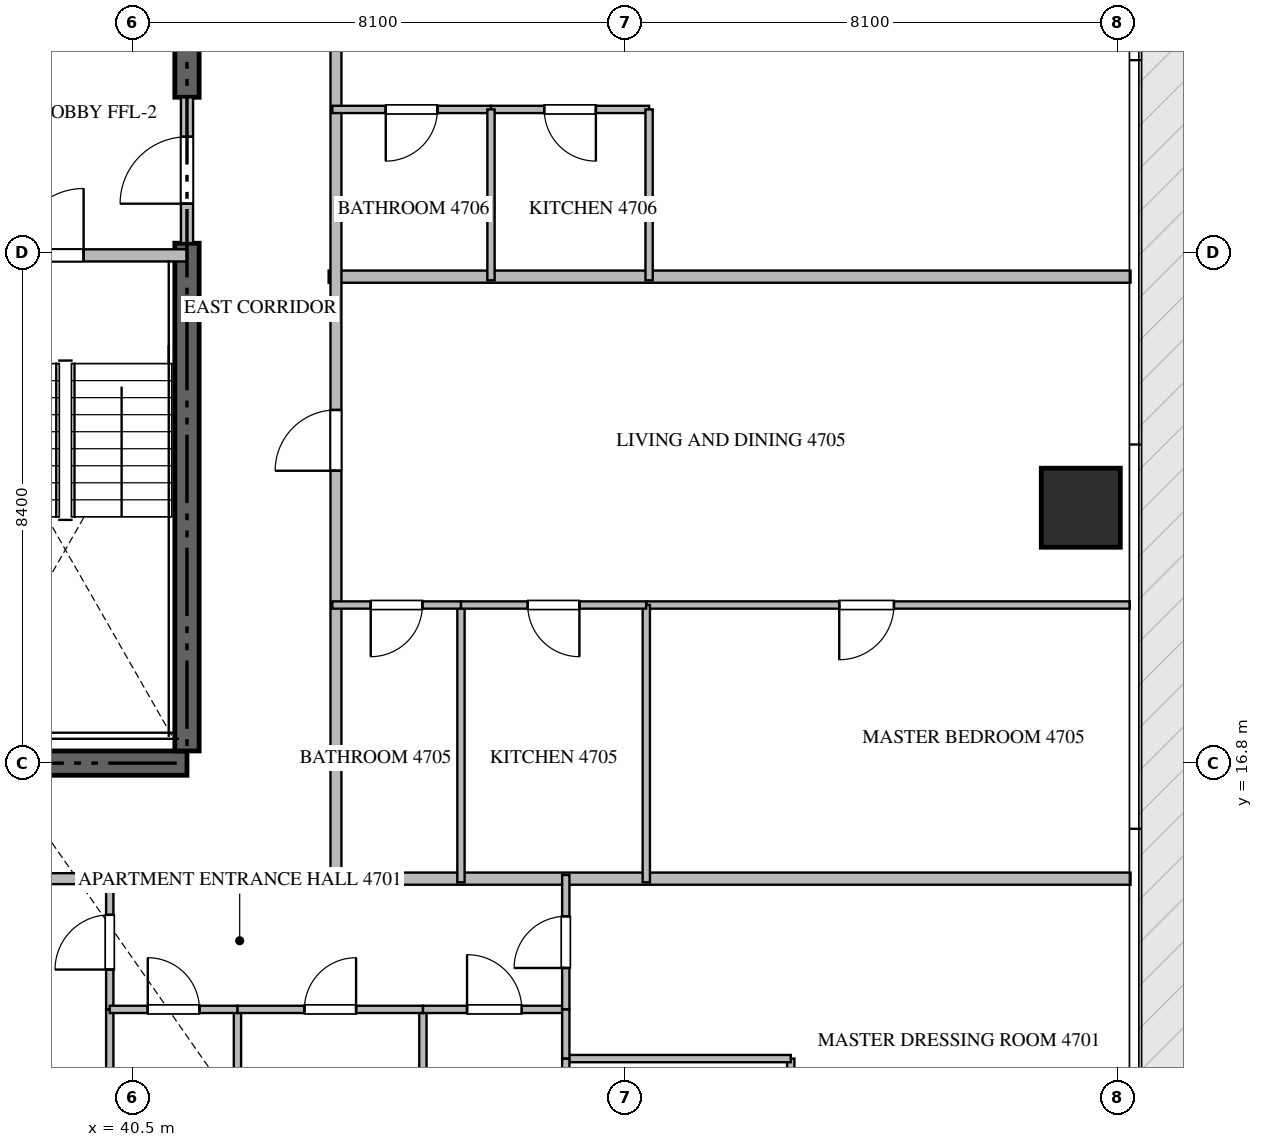
"""IFC4 building model, lengths in metres.
Left out: names, types, materials, properties, quantities, classifications, styles, units other than length and angle.
Written with IfcOpenShell. Run it as: python <this file> out.ifc"""

import sys

from ifc_helpers import new_model, si_unit, direction, frame, frame_2d, origin, origin_2d, place, context, subcontext, project, spatial, rectangle, extrude, source, transform, mapped, element, fill, save


model = new_model("IFC4")
c1 = context("Model", 3, precision=1e-05, world=origin(), true_north=direction((0.0, 1.0)))
c2 = subcontext(c1, "Body", "Model", "MODEL_VIEW")
j1 = project(units=[si_unit("LENGTHUNIT", "METRE"), si_unit("PLANEANGLEUNIT", "RADIAN")], contexts=[c1])
p1 = place(None, origin())
s1 = spatial("IfcSite", under=j1, at=p1, CompositionType="ELEMENT")
p2 = place(p1, origin())
s2 = spatial("IfcBuilding", under=s1, at=p2, CompositionType="ELEMENT")
p3 = place(p2, frame((0.0, 0.0, 187.65)))
s3 = spatial("IfcBuildingStorey", under=s2, at=p3, CompositionType="ELEMENT", Elevation=187.65)
p4 = place(p3, frame((23.4, 16.8, -0.26), z_axis=(0.0, 0.0, 1.0), x_axis=(1.0, 0.0, 0.0)))
e1 = element("IfcWall", 1, at=p4, inside=s3, PredefinedType="SHEAR", context=c2, shape_type="SweptSolid", body=[
    extrude(rectangle(XDim=18.0, YDim=0.4, at=frame_2d((9.0, 0.0))), origin(), (0.0, 0.0, 1.0), 3.748),
])
p5 = place(p3, frame((41.4, 17.0, -0.26), z_axis=(0.0, 0.0, 1.0), x_axis=(0.0, 1.0, 0.0)))
e2 = element("IfcWall", 2, at=p5, inside=s3, PredefinedType="SHEAR", context=c2, shape_type="SweptSolid", body=[
    extrude(rectangle(XDim=8.35, YDim=0.4, at=frame_2d((4.175, 0.0))), origin(), (0.0, 0.0, 1.0), 3.748),
])
p6 = place(p3, frame((41.4, 27.75, -0.26), z_axis=(0.0, 0.0, 1.0), x_axis=(0.0, 1.0, 0.0)))
e3 = element("IfcWall", 3, at=p6, inside=s3, PredefinedType="SHEAR", context=c2, shape_type="SweptSolid", body=[
    extrude(rectangle(XDim=5.65, YDim=0.4, at=frame_2d((2.825, 0.0))), origin(), (0.0, 0.0, 1.0), 3.748),
])
m1 = source(origin(), c2, "Body", "SweptSolid", [
    extrude(rectangle(XDim=1.3, YDim=1.3, at=origin_2d()), origin(), (0.0, 0.0, 1.0), 3.75),
])
p7 = place(p3, frame((56.1, 21.0, -0.26), z_axis=(0.0, 0.0, 1.0), x_axis=(1.0, 0.0, 0.0)))
e4 = element("IfcColumn", 4, at=p7, inside=s3, PredefinedType="COLUMN", context=c2, shape_type="MappedRepresentation", body=[
    mapped(m1, transform((0.0, 0.0, 0.0), scale=1.0)),
])
p8 = place(p3, frame((36.95, 25.15, 0.0), z_axis=(0.0, 0.0, 1.0), x_axis=(1.0, 0.0, 0.0)))
e5 = element("IfcWall", 5, at=p8, inside=s3, PredefinedType="STANDARD", context=c2, shape_type="SweptSolid", body=[
    extrude(rectangle(XDim=4.45, YDim=0.2, at=frame_2d((2.225, 0.0))), origin(), (0.0, 0.0, 1.0), 3.49),
])
p9 = place(p8, frame((1.65, 0.0, 0.0)))
e6 = element("IfcOpeningElement", 6, at=p9, cuts=e5, PredefinedType="OPENING", context=c2, shape_type="SweptSolid", body=[
    extrude(rectangle(XDim=1.1, YDim=2.15, at=frame_2d((0.55, 1.075))), frame((0.0, 0.11, 0.0), z_axis=(0.0, -1.0, 0.0), x_axis=(1.0, 0.0, 0.0)), (0.0, 0.0, 1.0), 0.22),
])
p10 = place(p3, frame((41.4, 25.352, 0.0), z_axis=(0.0, 0.0, 1.0), x_axis=(0.0, 1.0, 0.0)))
e7 = element("IfcWall", 7, at=p10, inside=s3, PredefinedType="STANDARD", context=c2, shape_type="SweptSolid", body=[
    extrude(rectangle(XDim=2.396, YDim=0.2, at=frame_2d((1.198, 0.0))), origin(), (0.0, 0.0, 1.0), 3.49),
])
p11 = place(p10, frame((0.648, 0.0, 0.0)))
e8 = element("IfcOpeningElement", 8, at=p11, cuts=e7, PredefinedType="OPENING", context=c2, shape_type="SweptSolid", body=[
    extrude(rectangle(XDim=1.1, YDim=2.15, at=frame_2d((0.55, 1.075))), frame((0.0, 0.11, 0.0), z_axis=(0.0, -1.0, 0.0), x_axis=(1.0, 0.0, 0.0)), (0.0, 0.0, 1.0), 0.22),
])
p12 = place(p3, frame((43.73, 24.8, 0.0), z_axis=(0.0, 0.0, 1.0), x_axis=(1.0, 0.0, 0.0)))
e9 = element("IfcWall", 9, at=p12, inside=s3, PredefinedType="PARTITIONING", context=c2, shape_type="SweptSolid", body=[
    extrude(rectangle(XDim=13.188, YDim=0.2, at=frame_2d((6.594, 0.0))), origin(), (0.0, 0.0, 1.0), 3.49),
])
p13 = place(p3, frame((43.85, 14.9, 0.0), z_axis=(0.0, 0.0, 1.0), x_axis=(1.0, 0.0, 0.0)))
e10 = element("IfcWall", 10, at=p13, inside=s3, PredefinedType="PARTITIONING", context=c2, shape_type="SweptSolid", body=[
    extrude(rectangle(XDim=13.068, YDim=0.2, at=frame_2d((6.534, 0.0))), origin(), (0.0, 0.0, 1.0), 3.49),
])
p14 = place(p3, frame((20.952, 14.9, 0.0), z_axis=(0.0, 0.0, 1.0), x_axis=(1.0, 0.0, 0.0)))
e11 = element("IfcWall", 11, at=p14, inside=s3, PredefinedType="PARTITIONING", context=c2, shape_type="SweptSolid", body=[
    extrude(rectangle(XDim=22.896, YDim=0.18, at=frame_2d((11.448, 0.0))), origin(), (0.0, 0.0, 1.0), 3.49),
])
p15 = place(p14, frame((15.809, 0.0, 0.0)))
e12 = element("IfcOpeningElement", 12, at=p15, cuts=e11, PredefinedType="OPENING", context=c2, shape_type="SweptSolid", body=[
    extrude(rectangle(XDim=1.0, YDim=2.15, at=frame_2d((0.5, 1.075))), frame((0.0, 0.1, 0.0), z_axis=(0.0, -1.0, 0.0), x_axis=(1.0, 0.0, 0.0)), (0.0, 0.0, 1.0), 0.2),
])
p16 = place(p3, frame((43.85, 14.9, 0.0), z_axis=(0.0, 0.0, 1.0), x_axis=(0.0, 1.0, 0.0)))
e13 = element("IfcWall", 13, at=p16, inside=s3, PredefinedType="PARTITIONING", context=c2, shape_type="SweptSolid", body=[
    extrude(rectangle(XDim=18.7, YDim=0.18, at=frame_2d((9.35, 0.0))), origin(), (0.0, 0.0, 1.0), 3.49),
])
p17 = place(p16, frame((6.708, 0.0, 0.0)))
e14 = element("IfcOpeningElement", 14, at=p17, cuts=e13, PredefinedType="OPENING", context=c2, shape_type="SweptSolid", body=[
    extrude(rectangle(XDim=1.0, YDim=2.15, at=frame_2d((0.5, 1.075))), frame((0.0, 0.1, 0.0), z_axis=(0.0, -1.0, 0.0), x_axis=(1.0, 0.0, 0.0)), (0.0, 0.0, 1.0), 0.2),
])
p18 = place(p16, frame((15.134, 0.0, 0.0)))
e15 = element("IfcOpeningElement", 15, at=p18, cuts=e13, PredefinedType="OPENING", context=c2, shape_type="SweptSolid", body=[
    extrude(rectangle(XDim=1.0, YDim=2.15, at=frame_2d((0.5, 1.075))), frame((0.0, 0.1, 0.0), z_axis=(0.0, -1.0, 0.0), x_axis=(1.0, 0.0, 0.0)), (0.0, 0.0, 1.0), 0.2),
])
p19 = place(p3, frame((40.13, 12.75, 0.0), z_axis=(0.0, 0.0, 1.0), x_axis=(0.0, 1.0, 0.0)))
e16 = element("IfcWall", 16, at=p19, inside=s3, PredefinedType="PARTITIONING", context=c2, shape_type="SweptSolid", body=[
    extrude(rectangle(XDim=2.21, YDim=0.12, at=frame_2d((1.105, 0.0))), origin(), (0.0, 0.0, 1.0), 3.49),
])
p20 = place(p19, frame((0.655, 0.0, 0.0)))
e17 = element("IfcOpeningElement", 17, at=p20, cuts=e16, PredefinedType="OPENING", context=c2, shape_type="SweptSolid", body=[
    extrude(rectangle(XDim=0.9, YDim=2.1, at=frame_2d((0.45, 1.05))), frame((0.0, 0.07, 0.0), z_axis=(0.0, -1.0, 0.0), x_axis=(1.0, 0.0, 0.0)), (0.0, 0.0, 1.0), 0.14),
])
p21 = place(p3, frame((40.13, 8.065, 0.0), z_axis=(0.0, 0.0, 1.0), x_axis=(0.0, 1.0, 0.0)))
e18 = element("IfcWall", 18, at=p21, inside=s3, PredefinedType="PARTITIONING", context=c2, shape_type="SweptSolid", body=[
    extrude(rectangle(XDim=4.683, YDim=0.12, at=frame_2d((2.342, 0.0))), origin(), (0.0, 0.0, 1.0), 3.49),
])
p22 = place(p3, frame((45.28, 1.495, 0.0), z_axis=(0.0, 0.0, 1.0), x_axis=(0.0, 1.0, 0.0)))
e19 = element("IfcWall", 19, at=p22, inside=s3, PredefinedType="PARTITIONING", context=c2, shape_type="SweptSolid", body=[
    extrude(rectangle(XDim=11.255, YDim=0.12, at=frame_2d((5.627, 0.0))), origin(), (0.0, 0.0, 1.0), 3.49),
])
p23 = place(p3, frame((42.23, 8.063, 0.0), z_axis=(0.0, 0.0, 1.0), x_axis=(0.0, 1.0, 0.0)))
e20 = element("IfcWall", 20, at=p23, inside=s3, PredefinedType="PARTITIONING", context=c2, shape_type="SweptSolid", body=[
    extrude(rectangle(XDim=4.687, YDim=0.12, at=frame_2d((2.344, 0.0))), origin(), (0.0, 0.0, 1.0), 3.49),
])
p24 = place(p3, frame((40.13, 12.75, 0.0), z_axis=(0.0, 0.0, 1.0), x_axis=(1.0, 0.0, 0.0)))
e21 = element("IfcWall", 21, at=p24, inside=s3, PredefinedType="PARTITIONING", context=c2, shape_type="SweptSolid", body=[
    extrude(rectangle(XDim=2.1, YDim=0.12, at=frame_2d((1.05, 0.0))), origin(), (0.0, 0.0, 1.0), 3.49),
])
p25 = place(p24, frame((0.625, 0.0, 0.0)))
e22 = element("IfcOpeningElement", 22, at=p25, cuts=e21, PredefinedType="OPENING", context=c2, shape_type="SweptSolid", body=[
    extrude(rectangle(XDim=0.85, YDim=2.1, at=frame_2d((0.425, 1.05))), frame((0.0, 0.07, 0.0), z_axis=(0.0, -1.0, 0.0), x_axis=(1.0, 0.0, 0.0)), (0.0, 0.0, 1.0), 0.14),
])
p26 = place(p3, frame((42.232, 12.75, 0.0), z_axis=(0.0, 0.0, 1.0), x_axis=(1.0, 0.0, 0.0)))
e23 = element("IfcWall", 23, at=p26, inside=s3, PredefinedType="PARTITIONING", context=c2, shape_type="SweptSolid", body=[
    extrude(rectangle(XDim=3.048, YDim=0.12, at=frame_2d((1.524, 0.0))), origin(), (0.0, 0.0, 1.0), 3.49),
])
p27 = place(p26, frame((1.099, 0.0, 0.0)))
e24 = element("IfcOpeningElement", 24, at=p27, cuts=e23, PredefinedType="OPENING", context=c2, shape_type="SweptSolid", body=[
    extrude(rectangle(XDim=0.85, YDim=2.1, at=frame_2d((0.425, 1.05))), frame((0.0, 0.07, 0.0), z_axis=(0.0, -1.0, 0.0), x_axis=(1.0, 0.0, 0.0)), (0.0, 0.0, 1.0), 0.14),
])
p28 = place(p3, frame((45.282, 12.75, 0.0), z_axis=(0.0, 0.0, 1.0), x_axis=(1.0, 0.0, 0.0)))
e25 = element("IfcWall", 25, at=p28, inside=s3, PredefinedType="PARTITIONING", context=c2, shape_type="SweptSolid", body=[
    extrude(rectangle(XDim=2.348, YDim=0.12, at=frame_2d((1.174, 0.0))), origin(), (0.0, 0.0, 1.0), 3.49),
])
p29 = place(p28, frame((0.724, 0.0, 0.0)))
e26 = element("IfcOpeningElement", 26, at=p29, cuts=e25, PredefinedType="OPENING", context=c2, shape_type="SweptSolid", body=[
    extrude(rectangle(XDim=0.9, YDim=2.1, at=frame_2d((0.45, 1.05))), frame((0.0, 0.07, 0.0), z_axis=(0.0, -1.0, 0.0), x_axis=(1.0, 0.0, 0.0)), (0.0, 0.0, 1.0), 0.14),
])
p30 = place(p3, frame((51.33, 5.495, 0.0), z_axis=(0.0, 0.0, 1.0), x_axis=(0.0, 1.0, 0.0)))
e27 = element("IfcWall", 27, at=p30, inside=s3, PredefinedType="PARTITIONING", context=c2, shape_type="SweptSolid", body=[
    extrude(rectangle(XDim=6.446, YDim=0.12, at=frame_2d((3.223, 0.0))), origin(), (0.0, 0.0, 1.0), 3.49),
])
p31 = place(p3, frame((47.63, 11.941, 0.0), z_axis=(0.0, 0.0, 1.0), x_axis=(1.0, 0.0, 0.0)))
e28 = element("IfcWall", 28, at=p31, inside=s3, PredefinedType="PARTITIONING", context=c2, shape_type="SweptSolid", body=[
    extrude(rectangle(XDim=3.7, YDim=0.12, at=frame_2d((1.85, 0.0))), origin(), (0.0, 0.0, 1.0), 3.49),
])
p32 = place(p3, frame((47.63, 8.157, 0.0), z_axis=(0.0, 0.0, 1.0), x_axis=(0.0, 1.0, 0.0)))
e29 = element("IfcWall", 29, at=p32, inside=s3, PredefinedType="PARTITIONING", context=c2, shape_type="SweptSolid", body=[
    extrude(rectangle(XDim=3.784, YDim=0.12, at=frame_2d((1.892, 0.0))), origin(), (0.0, 0.0, 1.0), 3.49),
])
p33 = place(p32, frame((1.467, 0.0, 0.0)))
e30 = element("IfcOpeningElement", 30, at=p33, cuts=e29, PredefinedType="OPENING", context=c2, shape_type="SweptSolid", body=[
    extrude(rectangle(XDim=0.85, YDim=2.1, at=frame_2d((0.425, 1.05))), frame((0.0, 0.07, 0.0), z_axis=(0.0, -1.0, 0.0), x_axis=(1.0, 0.0, 0.0)), (0.0, 0.0, 1.0), 0.14),
])
p34 = place(p3, frame((47.63, 11.943, 0.0), z_axis=(0.0, 0.0, 1.0), x_axis=(0.0, 1.0, 0.0)))
e31 = element("IfcWall", 31, at=p34, inside=s3, PredefinedType="PARTITIONING", context=c2, shape_type="SweptSolid", body=[
    extrude(rectangle(XDim=0.807, YDim=0.12, at=frame_2d((0.403, 0.0))), origin(), (0.0, 0.0, 1.0), 3.49),
])
p35 = place(p3, frame((47.63, 12.752, 0.0), z_axis=(0.0, 0.0, 1.0), x_axis=(0.0, 1.0, 0.0)))
e32 = element("IfcWall", 32, at=p35, inside=s3, PredefinedType="PARTITIONING", context=c2, shape_type="SweptSolid", body=[
    extrude(rectangle(XDim=2.208, YDim=0.12, at=frame_2d((1.104, 0.0))), origin(), (0.0, 0.0, 1.0), 3.49),
])
p36 = place(p35, frame((0.679, 0.0, 0.0)))
e33 = element("IfcOpeningElement", 33, at=p36, cuts=e32, PredefinedType="OPENING", context=c2, shape_type="SweptSolid", body=[
    extrude(rectangle(XDim=0.85, YDim=2.1, at=frame_2d((0.425, 1.05))), frame((0.0, 0.07, 0.0), z_axis=(0.0, -1.0, 0.0), x_axis=(1.0, 0.0, 0.0)), (0.0, 0.0, 1.0), 0.14),
])
p37 = place(p3, frame((56.905, 19.4, 0.0), z_axis=(0.0, 0.0, 1.0), x_axis=(-1.0, 0.0, 0.0)))
e34 = element("IfcWall", 34, at=p37, inside=s3, PredefinedType="PARTITIONING", context=c2, shape_type="SweptSolid", body=[
    extrude(rectangle(XDim=7.951, YDim=0.12, at=frame_2d((3.976, 0.0))), origin(), (0.0, 0.0, 1.0), 3.49),
])
p38 = place(p37, frame((3.878, 0.0, 0.0)))
e35 = element("IfcOpeningElement", 35, at=p38, cuts=e34, PredefinedType="OPENING", context=c2, shape_type="SweptSolid", body=[
    extrude(rectangle(XDim=0.9, YDim=2.1, at=frame_2d((0.45, 1.05))), frame((0.0, 0.07, 0.0), z_axis=(0.0, -1.0, 0.0), x_axis=(1.0, 0.0, 0.0)), (0.0, 0.0, 1.0), 0.14),
])
for number, where, z_axis, x_axis in (
    (36, (48.954, 14.84, 0.0), (0.0, 0.0, 1.0), (0.0, 1.0, 0.0)),
    (37, (45.906, 14.84, 0.0), (0.0, 0.0, 1.0), (0.0, 1.0, 0.0)),
):
    element("IfcWall", number, at=place(p3, frame(where, z_axis=z_axis, x_axis=x_axis)), inside=s3, PredefinedType="PARTITIONING", context=c2, shape_type="SweptSolid", body=[
        extrude(rectangle(XDim=4.56, YDim=0.12, at=frame_2d((2.28, 0.0))), origin(), (0.0, 0.0, 1.0), 3.49),
    ])
p39 = place(p3, frame((48.952, 19.4, 0.0), z_axis=(0.0, 0.0, 1.0), x_axis=(-1.0, 0.0, 0.0)))
e38 = element("IfcWall", 38, at=p39, inside=s3, PredefinedType="PARTITIONING", context=c2, shape_type="SweptSolid", body=[
    extrude(rectangle(XDim=3.046, YDim=0.12, at=frame_2d((1.523, 0.0))), origin(), (0.0, 0.0, 1.0), 3.49),
])
p40 = place(p39, frame((1.098, 0.0, 0.0)))
e39 = element("IfcOpeningElement", 39, at=p40, cuts=e38, PredefinedType="OPENING", context=c2, shape_type="SweptSolid", body=[
    extrude(rectangle(XDim=0.85, YDim=2.1, at=frame_2d((0.425, 1.05))), frame((0.0, 0.07, 0.0), z_axis=(0.0, -1.0, 0.0), x_axis=(1.0, 0.0, 0.0)), (0.0, 0.0, 1.0), 0.14),
])
p41 = place(p3, frame((45.904, 19.4, 0.0), z_axis=(0.0, 0.0, 1.0), x_axis=(-1.0, 0.0, 0.0)))
e40 = element("IfcWall", 40, at=p41, inside=s3, PredefinedType="PARTITIONING", context=c2, shape_type="SweptSolid", body=[
    extrude(rectangle(XDim=2.114, YDim=0.12, at=frame_2d((1.057, 0.0))), origin(), (0.0, 0.0, 1.0), 3.49),
])
p42 = place(p41, frame((0.632, 0.0, 0.0)))
e41 = element("IfcOpeningElement", 41, at=p42, cuts=e40, PredefinedType="OPENING", context=c2, shape_type="SweptSolid", body=[
    extrude(rectangle(XDim=0.85, YDim=2.1, at=frame_2d((0.425, 1.05))), frame((0.0, 0.07, 0.0), z_axis=(0.0, -1.0, 0.0), x_axis=(1.0, 0.0, 0.0)), (0.0, 0.0, 1.0), 0.14),
])
p43 = place(p3, frame((49.0, 27.55, 0.0), z_axis=(0.0, 0.0, 1.0), x_axis=(-1.0, 0.0, 0.0)))
e42 = element("IfcWall", 42, at=p43, inside=s3, PredefinedType="PARTITIONING", context=c2, shape_type="SweptSolid", body=[
    extrude(rectangle(XDim=2.6, YDim=0.12, at=frame_2d((1.3, 0.0))), origin(), (0.0, 0.0, 1.0), 3.49),
])
p44 = place(p43, frame((0.875, 0.0, 0.0)))
e43 = element("IfcOpeningElement", 43, at=p44, cuts=e42, PredefinedType="OPENING", context=c2, shape_type="SweptSolid", body=[
    extrude(rectangle(XDim=0.85, YDim=2.1, at=frame_2d((0.425, 1.05))), frame((0.0, 0.07, 0.0), z_axis=(0.0, -1.0, 0.0), x_axis=(1.0, 0.0, 0.0)), (0.0, 0.0, 1.0), 0.14),
])
p45 = place(p3, frame((46.398, 27.55, 0.0), z_axis=(0.0, 0.0, 1.0), x_axis=(-1.0, 0.0, 0.0)))
e44 = element("IfcWall", 44, at=p45, inside=s3, PredefinedType="PARTITIONING", context=c2, shape_type="SweptSolid", body=[
    extrude(rectangle(XDim=2.608, YDim=0.12, at=frame_2d((1.304, 0.0))), origin(), (0.0, 0.0, 1.0), 3.49),
])
p46 = place(p45, frame((0.879, 0.0, 0.0)))
e45 = element("IfcOpeningElement", 45, at=p46, cuts=e44, PredefinedType="OPENING", context=c2, shape_type="SweptSolid", body=[
    extrude(rectangle(XDim=0.85, YDim=2.1, at=frame_2d((0.425, 1.05))), frame((0.0, 0.07, 0.0), z_axis=(0.0, -1.0, 0.0), x_axis=(1.0, 0.0, 0.0)), (0.0, 0.0, 1.0), 0.14),
])
for number, where, z_axis, x_axis in (
    (46, (46.4, 24.74, 0.0), (0.0, 0.0, 1.0), (0.0, 1.0, 0.0)),
    (47, (49.0, 24.74, 0.0), (0.0, 0.0, 1.0), (0.0, 1.0, 0.0)),
):
    element("IfcWall", number, at=place(p3, frame(where, z_axis=z_axis, x_axis=x_axis)), inside=s3, PredefinedType="PARTITIONING", context=c2, shape_type="SweptSolid", body=[
        extrude(rectangle(XDim=2.81, YDim=0.12, at=frame_2d((1.405, 0.0))), origin(), (0.0, 0.0, 1.0), 3.49),
    ])
m2 = source(origin(), c2, "Body", "SweptSolid", [
    extrude(rectangle(XDim=1.1, YDim=2.15, at=frame_2d((0.55, 1.075))), frame((0.0, 0.025, 0.0), z_axis=(0.0, -1.0, 0.0), x_axis=(1.0, 0.0, 0.0)), (0.0, 0.0, 1.0), 0.05),
])
p47 = place(p9, origin())
e48 = element("IfcDoor", 48, at=p47, inside=s3, OperationType="SINGLE_SWING_RIGHT", PredefinedType="DOOR", context=c2, shape_type="MappedRepresentation", body=[
    mapped(m2, transform((0.0, 0.0, 0.0), scale=1.0)),
])
fill(e6, e48)
p48 = place(p11, origin())
e49 = element("IfcDoor", 49, at=p48, inside=s3, OperationType="SINGLE_SWING_LEFT", PredefinedType="DOOR", context=c2, shape_type="MappedRepresentation", body=[
    mapped(m2, transform((0.0, 0.0, 0.0), scale=1.0)),
])
fill(e8, e49)
m3 = source(origin(), c2, "Body", "SweptSolid", [
    extrude(rectangle(XDim=1.0, YDim=2.15, at=frame_2d((0.5, 1.075))), frame((0.0, 0.025, 0.0), z_axis=(0.0, -1.0, 0.0), x_axis=(1.0, 0.0, 0.0)), (0.0, 0.0, 1.0), 0.05),
])
p49 = place(p17, origin())
e50 = element("IfcDoor", 50, at=p49, inside=s3, OperationType="SINGLE_SWING_LEFT", PredefinedType="DOOR", context=c2, shape_type="MappedRepresentation", body=[
    mapped(m3, transform((0.0, 0.0, 0.0), scale=1.0)),
])
fill(e14, e50)
m4 = source(origin(), c2, "Body", "SweptSolid", [
    extrude(rectangle(XDim=0.9, YDim=2.1, at=frame_2d((0.45, 1.05))), frame((0.0, 0.025, 0.0), z_axis=(0.0, -1.0, 0.0), x_axis=(1.0, 0.0, 0.0)), (0.0, 0.0, 1.0), 0.05),
])
p50 = place(p20, origin())
e51 = element("IfcDoor", 51, at=p50, inside=s3, OperationType="SINGLE_SWING_LEFT", PredefinedType="DOOR", context=c2, shape_type="MappedRepresentation", body=[
    mapped(m4, transform((0.0, 0.0, 0.0), scale=1.0)),
])
fill(e17, e51)
m5 = source(origin(), c2, "Body", "SweptSolid", [
    extrude(rectangle(XDim=0.85, YDim=2.1, at=frame_2d((0.425, 1.05))), frame((0.0, 0.025, 0.0), z_axis=(0.0, -1.0, 0.0), x_axis=(1.0, 0.0, 0.0)), (0.0, 0.0, 1.0), 0.05),
])
p51 = place(p25, origin())
e52 = element("IfcDoor", 52, at=p51, inside=s3, OperationType="SINGLE_SWING_LEFT", PredefinedType="DOOR", context=c2, shape_type="MappedRepresentation", body=[
    mapped(m5, transform((0.0, 0.0, 0.0), scale=1.0)),
])
fill(e22, e52)
p52 = place(p27, origin())
e53 = element("IfcDoor", 53, at=p52, inside=s3, OperationType="SINGLE_SWING_RIGHT", PredefinedType="DOOR", context=c2, shape_type="MappedRepresentation", body=[
    mapped(m5, transform((0.0, 0.0, 0.0), scale=1.0)),
])
fill(e24, e53)
p53 = place(p29, origin())
e54 = element("IfcDoor", 54, at=p53, inside=s3, OperationType="SINGLE_SWING_LEFT", PredefinedType="DOOR", context=c2, shape_type="MappedRepresentation", body=[
    mapped(m4, transform((0.0, 0.0, 0.0), scale=1.0)),
])
fill(e26, e54)
p54 = place(p36, origin())
e55 = element("IfcDoor", 55, at=p54, inside=s3, OperationType="SINGLE_SWING_LEFT", PredefinedType="DOOR", context=c2, shape_type="MappedRepresentation", body=[
    mapped(m5, transform((0.0, 0.0, 0.0), scale=1.0)),
])
fill(e33, e55)
p55 = place(p38, origin())
e56 = element("IfcDoor", 56, at=p55, inside=s3, OperationType="SINGLE_SWING_RIGHT", PredefinedType="DOOR", context=c2, shape_type="MappedRepresentation", body=[
    mapped(m4, transform((0.0, 0.0, 0.0), scale=1.0)),
])
fill(e35, e56)
p56 = place(p40, origin())
e57 = element("IfcDoor", 57, at=p56, inside=s3, OperationType="SINGLE_SWING_LEFT", PredefinedType="DOOR", context=c2, shape_type="MappedRepresentation", body=[
    mapped(m5, transform((0.0, 0.0, 0.0), scale=1.0)),
])
fill(e39, e57)
p57 = place(p42, origin())
e58 = element("IfcDoor", 58, at=p57, inside=s3, OperationType="SINGLE_SWING_RIGHT", PredefinedType="DOOR", context=c2, shape_type="MappedRepresentation", body=[
    mapped(m5, transform((0.0, 0.0, 0.0), scale=1.0)),
])
fill(e41, e58)
p58 = place(p44, origin())
e59 = element("IfcDoor", 59, at=p58, inside=s3, OperationType="SINGLE_SWING_LEFT", PredefinedType="DOOR", context=c2, shape_type="MappedRepresentation", body=[
    mapped(m5, transform((0.0, 0.0, 0.0), scale=1.0)),
])
fill(e43, e59)
p59 = place(p46, origin())
e60 = element("IfcDoor", 60, at=p59, inside=s3, OperationType="SINGLE_SWING_RIGHT", PredefinedType="DOOR", context=c2, shape_type="MappedRepresentation", body=[
    mapped(m5, transform((0.0, 0.0, 0.0), scale=1.0)),
])
fill(e45, e60)
save(model, sys.argv[1])
